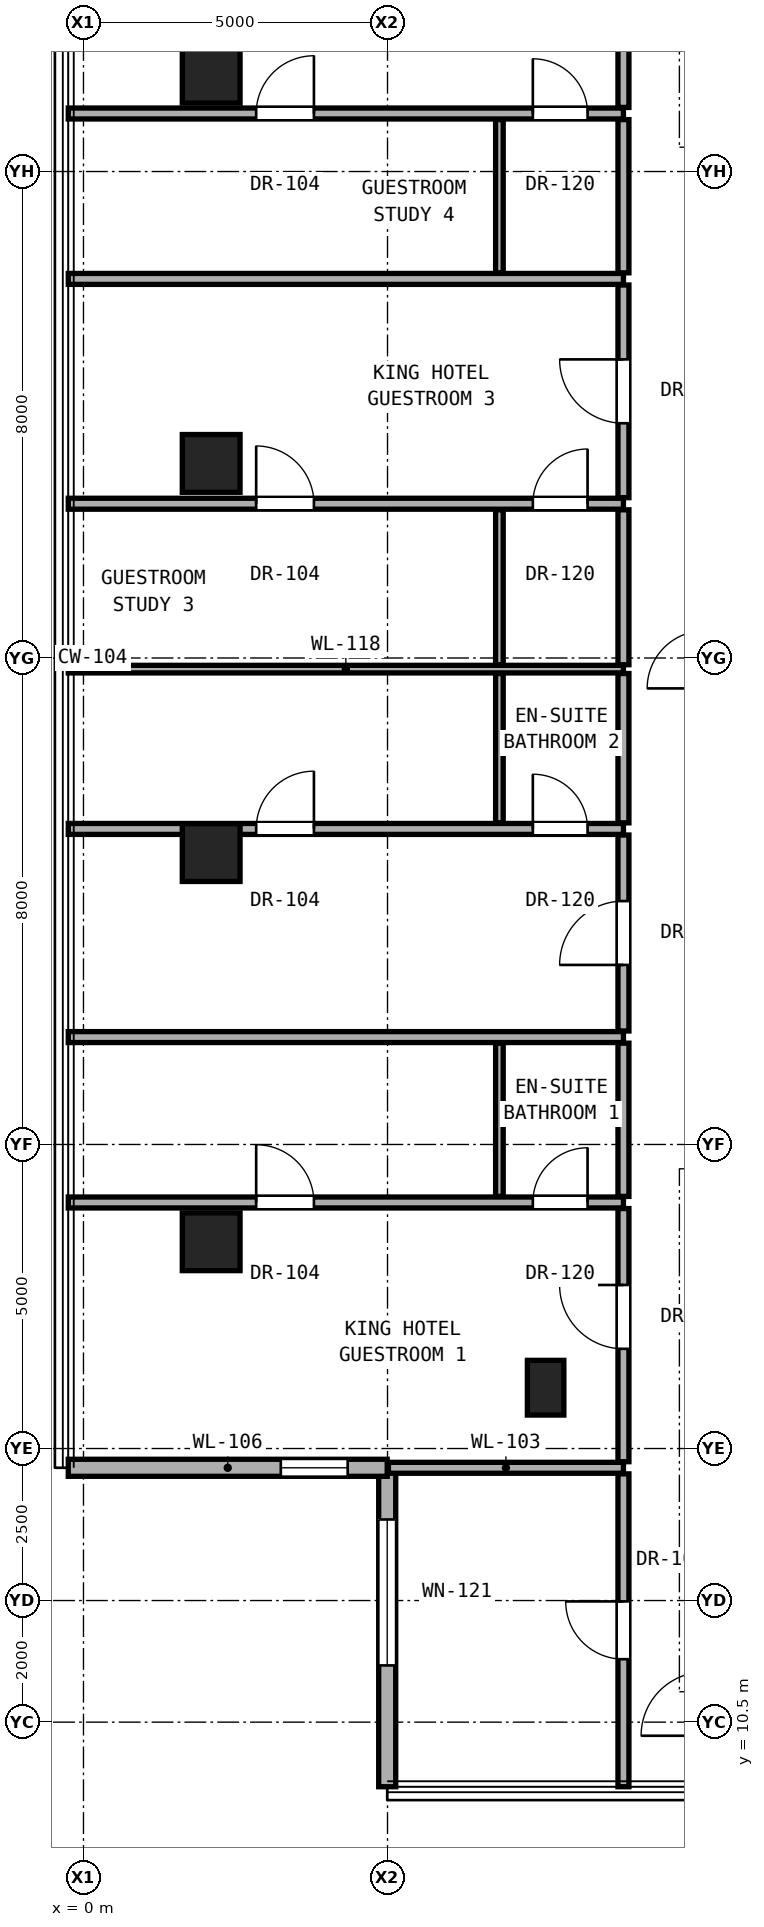
"""IFC4 building model, lengths in metres.
Left out: names, types, materials, properties, quantities, classifications, styles, units other than length and angle.
Written with IfcOpenShell. Run it as: python <this file> out.ifc"""

import sys

from ifc_helpers import new_model, si_unit, direction, frame, frame_2d, origin, origin_2d, place, context, subcontext, project, spatial, rectangle, hollow_rectangle, extrude, element, fill, save


model = new_model("IFC4")
c1 = context("Model", 3, precision=1e-05, world=origin(), true_north=direction((0.0, 1.0)))
c2 = subcontext(c1, "Body", "Model", "MODEL_VIEW")
j1 = project(units=[si_unit("LENGTHUNIT", "METRE"), si_unit("PLANEANGLEUNIT", "RADIAN")], contexts=[c1])
p1 = place(None, origin())
s1 = spatial("IfcSite", under=j1, at=p1, CompositionType="ELEMENT")
p2 = place(p1, origin())
s2 = spatial("IfcBuilding", under=s1, at=p2, CompositionType="ELEMENT")
p3 = place(p2, frame((0.0, 0.0, 167.4)))
s3 = spatial("IfcBuildingStorey", under=s2, at=p3, CompositionType="ELEMENT", Elevation=167.4)
for number, where, z_axis, x_axis in (
    (1, (2.1, 18.4, 0.0), (0.0, 0.0, 1.0), (1.0, 0.0, 0.0)),
    (2, (2.1, 24.8, 0.0), (0.0, 0.0, 1.0), (1.0, 0.0, 0.0)),
    (3, (2.1, 31.2, 0.0), (0.0, 0.0, 1.0), (1.0, 0.0, 0.0)),
    (4, (2.1, 37.6, 0.0), (0.0, 0.0, 1.0), (1.0, 0.0, 0.0)),
):
    element("IfcColumn", number, at=place(p3, frame(where, z_axis=z_axis, x_axis=x_axis)), inside=s3, PredefinedType="COLUMN", context=c2, shape_type="SweptSolid", body=[
        extrude(hollow_rectangle(XDim=0.95, YDim=0.95, WallThickness=0.05, at=origin_2d()), origin(), (0.0, 0.0, 1.0), 3.25),
    ])
p4 = place(p3, frame((7.6, 16.0, 0.0), z_axis=(0.0, 0.0, 1.0), x_axis=(1.0, 0.0, 0.0)))
e5 = element("IfcColumn", 5, at=p4, inside=s3, PredefinedType="PILASTER", context=c2, shape_type="SweptSolid", body=[
    extrude(rectangle(XDim=0.6, YDim=0.9, at=origin_2d()), origin(), (0.0, 0.0, 1.0), 3.25),
])
p5 = place(p3, frame((4.995, 14.683, 0.0), z_axis=(0.0, 0.0, 1.0), x_axis=(0.0, -1.0, 0.0)))
e6 = element("IfcWall", 6, at=p5, inside=s3, PredefinedType="SOLIDWALL", context=c2, shape_type="SweptSolid", body=[
    extrude(rectangle(XDim=5.245, YDim=0.28, at=frame_2d((2.623, 0.0))), origin(), (0.0, 0.0, 1.0), 3.03),
])
p6 = place(p5, frame((0.85, 0.0, 0.53)))
e7 = element("IfcOpeningElement", 7, at=p6, cuts=e6, PredefinedType="OPENING", context=c2, shape_type="SweptSolid", body=[
    extrude(rectangle(XDim=2.4, YDim=2.35, at=frame_2d((1.2, 1.175))), frame((0.0, 0.15, 0.0), z_axis=(0.0, -1.0, 0.0), x_axis=(1.0, 0.0, 0.0)), (0.0, 0.0, 1.0), 0.3),
])
p7 = place(p3, frame((-0.25, 14.683, 0.0), z_axis=(0.0, 0.0, 1.0), x_axis=(1.0, 0.0, 0.0)))
e8 = element("IfcWall", 8, at=p7, inside=s3, PredefinedType="SOLIDWALL", context=c2, shape_type="SweptSolid", body=[
    extrude(rectangle(XDim=5.245, YDim=0.28, at=frame_2d((2.623, 0.0))), origin(), (0.0, 0.0, 1.0), 3.03),
])
p8 = place(p7, frame((3.495, 0.0, 0.85)))
e9 = element("IfcOpeningElement", 9, at=p8, cuts=e8, PredefinedType="OPENING", context=c2, shape_type="SweptSolid", body=[
    extrude(rectangle(XDim=1.1, YDim=2.0, at=frame_2d((0.55, 1.0))), frame((0.0, 0.15, 0.0), z_axis=(0.0, -1.0, 0.0), x_axis=(1.0, 0.0, 0.0)), (0.0, 0.0, 1.0), 0.3),
])
p9 = place(p3, frame((5.015, 14.683, 0.0), z_axis=(0.0, 0.0, 1.0), x_axis=(1.0, 0.0, 0.0)))
e10 = element("IfcWall", 10, at=p9, inside=s3, PredefinedType="PARTITIONING", context=c2, shape_type="SweptSolid", body=[
    extrude(rectangle(XDim=3.865, YDim=0.18, at=frame_2d((1.933, 0.0))), origin(), (0.0, 0.0, 1.0), 3.05),
])
p10 = place(p3, frame((-0.25, 19.046, 0.0), z_axis=(0.0, 0.0, 1.0), x_axis=(1.0, 0.0, 0.0)))
e11 = element("IfcWall", 11, at=p10, inside=s3, PredefinedType="PARTITIONING", context=c2, shape_type="SweptSolid", body=[
    extrude(rectangle(XDim=9.13, YDim=0.18, at=frame_2d((4.565, 0.0))), origin(), (0.0, 0.0, 1.0), 2.269),
])
p11 = place(p10, frame((3.09, 0.0, 0.0)))
e12 = element("IfcOpeningElement", 12, at=p11, cuts=e11, PredefinedType="OPENING", context=c2, shape_type="SweptSolid", body=[
    extrude(rectangle(XDim=0.95, YDim=2.15, at=frame_2d((0.475, 1.075))), frame((0.0, 0.1, 0.0), z_axis=(0.0, -1.0, 0.0), x_axis=(1.0, 0.0, 0.0)), (0.0, 0.0, 1.0), 0.2),
])
p12 = place(p10, frame((7.64, 0.0, 0.0)))
e13 = element("IfcOpeningElement", 13, at=p12, cuts=e11, PredefinedType="OPENING", context=c2, shape_type="SweptSolid", body=[
    extrude(rectangle(XDim=0.9, YDim=2.1, at=frame_2d((0.45, 1.05))), frame((0.0, 0.1, 0.0), z_axis=(0.0, -1.0, 0.0), x_axis=(1.0, 0.0, 0.0)), (0.0, 0.0, 1.0), 0.2),
])
p13 = place(p3, frame((-0.25, 21.766, 0.0), z_axis=(0.0, 0.0, 1.0), x_axis=(1.0, 0.0, 0.0)))
e14 = element("IfcWall", 14, at=p13, inside=s3, PredefinedType="PARTITIONING", context=c2, shape_type="SweptSolid", body=[
    extrude(rectangle(XDim=9.13, YDim=0.18, at=frame_2d((4.565, 0.0))), origin(), (0.0, 0.0, 1.0), 2.269),
])
p14 = place(p3, frame((-0.25, 25.189, 0.0), z_axis=(0.0, 0.0, 1.0), x_axis=(1.0, 0.0, 0.0)))
e15 = element("IfcWall", 15, at=p14, inside=s3, PredefinedType="PARTITIONING", context=c2, shape_type="SweptSolid", body=[
    extrude(rectangle(XDim=9.13, YDim=0.18, at=frame_2d((4.565, 0.0))), origin(), (0.0, 0.0, 1.0), 2.269),
])
p15 = place(p14, frame((3.09, 0.0, 0.0)))
e16 = element("IfcOpeningElement", 16, at=p15, cuts=e15, PredefinedType="OPENING", context=c2, shape_type="SweptSolid", body=[
    extrude(rectangle(XDim=0.95, YDim=2.15, at=frame_2d((0.475, 1.075))), frame((0.0, 0.1, 0.0), z_axis=(0.0, -1.0, 0.0), x_axis=(1.0, 0.0, 0.0)), (0.0, 0.0, 1.0), 0.2),
])
p16 = place(p14, frame((7.64, 0.0, 0.0)))
e17 = element("IfcOpeningElement", 17, at=p16, cuts=e15, PredefinedType="OPENING", context=c2, shape_type="SweptSolid", body=[
    extrude(rectangle(XDim=0.9, YDim=2.1, at=frame_2d((0.45, 1.05))), frame((0.0, 0.1, 0.0), z_axis=(0.0, -1.0, 0.0), x_axis=(1.0, 0.0, 0.0)), (0.0, 0.0, 1.0), 0.2),
])
p17 = place(p3, frame((-0.25, 27.817, 0.0), z_axis=(0.0, 0.0, 1.0), x_axis=(1.0, 0.0, 0.0)))
e18 = element("IfcWall", 18, at=p17, inside=s3, PredefinedType="PARTITIONING", context=c2, shape_type="SweptSolid", body=[
    extrude(rectangle(XDim=9.13, YDim=0.125, at=frame_2d((4.565, 0.0))), origin(), (0.0, 0.0, 1.0), 2.269),
])
p18 = place(p3, frame((-0.25, 30.537, 0.0), z_axis=(0.0, 0.0, 1.0), x_axis=(1.0, 0.0, 0.0)))
e19 = element("IfcWall", 19, at=p18, inside=s3, PredefinedType="PARTITIONING", context=c2, shape_type="SweptSolid", body=[
    extrude(rectangle(XDim=9.13, YDim=0.18, at=frame_2d((4.565, 0.0))), origin(), (0.0, 0.0, 1.0), 2.269),
])
p19 = place(p18, frame((3.09, 0.0, 0.0)))
e20 = element("IfcOpeningElement", 20, at=p19, cuts=e19, PredefinedType="OPENING", context=c2, shape_type="SweptSolid", body=[
    extrude(rectangle(XDim=0.95, YDim=2.15, at=frame_2d((0.475, 1.075))), frame((0.0, 0.1, 0.0), z_axis=(0.0, -1.0, 0.0), x_axis=(1.0, 0.0, 0.0)), (0.0, 0.0, 1.0), 0.2),
])
p20 = place(p18, frame((7.64, 0.0, 0.0)))
e21 = element("IfcOpeningElement", 21, at=p20, cuts=e19, PredefinedType="OPENING", context=c2, shape_type="SweptSolid", body=[
    extrude(rectangle(XDim=0.9, YDim=2.1, at=frame_2d((0.45, 1.05))), frame((0.0, 0.1, 0.0), z_axis=(0.0, -1.0, 0.0), x_axis=(1.0, 0.0, 0.0)), (0.0, 0.0, 1.0), 0.2),
])
p21 = place(p3, frame((-0.25, 34.234, 0.0), z_axis=(0.0, 0.0, 1.0), x_axis=(1.0, 0.0, 0.0)))
e22 = element("IfcWall", 22, at=p21, inside=s3, PredefinedType="PARTITIONING", context=c2, shape_type="SweptSolid", body=[
    extrude(rectangle(XDim=9.13, YDim=0.18, at=frame_2d((4.565, 0.0))), origin(), (0.0, 0.0, 1.0), 2.269),
])
p22 = place(p3, frame((-0.25, 36.954, 0.0), z_axis=(0.0, 0.0, 1.0), x_axis=(1.0, 0.0, 0.0)))
e23 = element("IfcWall", 23, at=p22, inside=s3, PredefinedType="PARTITIONING", context=c2, shape_type="SweptSolid", body=[
    extrude(rectangle(XDim=9.13, YDim=0.18, at=frame_2d((4.565, 0.0))), origin(), (0.0, 0.0, 1.0), 2.269),
])
p23 = place(p22, frame((3.09, 0.0, 0.0)))
e24 = element("IfcOpeningElement", 24, at=p23, cuts=e23, PredefinedType="OPENING", context=c2, shape_type="SweptSolid", body=[
    extrude(rectangle(XDim=0.95, YDim=2.15, at=frame_2d((0.475, 1.075))), frame((0.0, 0.1, 0.0), z_axis=(0.0, -1.0, 0.0), x_axis=(1.0, 0.0, 0.0)), (0.0, 0.0, 1.0), 0.2),
])
p24 = place(p22, frame((7.64, 0.0, 0.0)))
e25 = element("IfcOpeningElement", 25, at=p24, cuts=e23, PredefinedType="OPENING", context=c2, shape_type="SweptSolid", body=[
    extrude(rectangle(XDim=0.9, YDim=2.1, at=frame_2d((0.45, 1.05))), frame((0.0, 0.1, 0.0), z_axis=(0.0, -1.0, 0.0), x_axis=(1.0, 0.0, 0.0)), (0.0, 0.0, 1.0), 0.2),
])
p25 = place(p3, frame((6.84, 19.146, 0.0), z_axis=(0.0, 0.0, 1.0), x_axis=(0.0, 1.0, 0.0)))
e26 = element("IfcWall", 26, at=p25, inside=s3, PredefinedType="PARTITIONING", context=c2, shape_type="SweptSolid", body=[
    extrude(rectangle(XDim=2.52, YDim=0.125, at=frame_2d((1.26, 0.0))), origin(), (0.0, 0.0, 1.0), 3.05),
])
p26 = place(p3, frame((6.84, 25.289, 0.0), z_axis=(0.0, 0.0, 1.0), x_axis=(0.0, 1.0, 0.0)))
e27 = element("IfcWall", 27, at=p26, inside=s3, PredefinedType="PARTITIONING", context=c2, shape_type="SweptSolid", body=[
    extrude(rectangle(XDim=2.455, YDim=0.125, at=frame_2d((1.228, 0.0))), origin(), (0.0, 0.0, 1.0), 3.05),
])
p27 = place(p3, frame((6.84, 27.889, 0.0), z_axis=(0.0, 0.0, 1.0), x_axis=(0.0, 1.0, 0.0)))
e28 = element("IfcWall", 28, at=p27, inside=s3, PredefinedType="PARTITIONING", context=c2, shape_type="SweptSolid", body=[
    extrude(rectangle(XDim=2.548, YDim=0.125, at=frame_2d((1.274, 0.0))), origin(), (0.0, 0.0, 1.0), 3.05),
])
p28 = place(p3, frame((6.84, 34.334, 0.0), z_axis=(0.0, 0.0, 1.0), x_axis=(0.0, 1.0, 0.0)))
e29 = element("IfcWall", 29, at=p28, inside=s3, PredefinedType="PARTITIONING", context=c2, shape_type="SweptSolid", body=[
    extrude(rectangle(XDim=2.52, YDim=0.125, at=frame_2d((1.26, 0.0))), origin(), (0.0, 0.0, 1.0), 3.05),
])
p29 = place(p3, frame((8.88, 9.438, 0.0), z_axis=(0.0, 0.0, 1.0), x_axis=(0.0, 1.0, 0.0)))
e30 = element("IfcWall", 30, at=p29, inside=s3, PredefinedType="PARTITIONING", context=c2, shape_type="SweptSolid", body=[
    extrude(rectangle(XDim=5.145, YDim=0.18, at=frame_2d((2.573, 0.0))), origin(), (0.0, 0.0, 1.0), 3.05),
])
p30 = place(p29, frame((2.097, 0.0, 0.0)))
e31 = element("IfcOpeningElement", 31, at=p30, cuts=e30, PredefinedType="OPENING", context=c2, shape_type="SweptSolid", body=[
    extrude(rectangle(XDim=0.95, YDim=2.15, at=frame_2d((0.475, 1.075))), frame((0.0, 0.1, 0.0), z_axis=(0.0, -1.0, 0.0), x_axis=(1.0, 0.0, 0.0)), (0.0, 0.0, 1.0), 0.2),
])
p31 = place(p3, frame((8.88, 14.783, 0.0), z_axis=(0.0, 0.0, 1.0), x_axis=(0.0, 1.0, 0.0)))
e32 = element("IfcWall", 32, at=p31, inside=s3, PredefinedType="PARTITIONING", context=c2, shape_type="SweptSolid", body=[
    extrude(rectangle(XDim=4.163, YDim=0.18, at=frame_2d((2.082, 0.0))), origin(), (0.0, 0.0, 1.0), 2.442),
])
p32 = place(p31, frame((1.856, 0.0, 0.0)))
e33 = element("IfcOpeningElement", 33, at=p32, cuts=e32, PredefinedType="OPENING", context=c2, shape_type="SweptSolid", body=[
    extrude(rectangle(XDim=1.05, YDim=2.2, at=frame_2d((0.525, 1.1))), frame((0.0, 0.1, 0.0), z_axis=(0.0, -1.0, 0.0), x_axis=(1.0, 0.0, 0.0)), (0.0, 0.0, 1.0), 0.2),
])
p33 = place(p3, frame((8.88, 19.146, 0.0), z_axis=(0.0, 0.0, 1.0), x_axis=(0.0, 1.0, 0.0)))
e34 = element("IfcWall", 34, at=p33, inside=s3, PredefinedType="PARTITIONING", context=c2, shape_type="SweptSolid", body=[
    extrude(rectangle(XDim=2.52, YDim=0.18, at=frame_2d((1.26, 0.0))), origin(), (0.0, 0.0, 1.0), 3.05),
])
p34 = place(p3, frame((8.88, 21.866, 0.0), z_axis=(0.0, 0.0, 1.0), x_axis=(0.0, 1.0, 0.0)))
e35 = element("IfcWall", 35, at=p34, inside=s3, PredefinedType="PARTITIONING", context=c2, shape_type="SweptSolid", body=[
    extrude(rectangle(XDim=3.223, YDim=0.18, at=frame_2d((1.612, 0.0))), origin(), (0.0, 0.0, 1.0), 2.346),
])
p35 = place(p34, frame((1.086, 0.0, 0.0)))
e36 = element("IfcOpeningElement", 36, at=p35, cuts=e35, PredefinedType="OPENING", context=c2, shape_type="SweptSolid", body=[
    extrude(rectangle(XDim=1.05, YDim=2.2, at=frame_2d((0.525, 1.1))), frame((0.0, 0.1, 0.0), z_axis=(0.0, -1.0, 0.0), x_axis=(1.0, 0.0, 0.0)), (0.0, 0.0, 1.0), 0.2),
])
p36 = place(p3, frame((8.88, 25.289, 0.0), z_axis=(0.0, 0.0, 1.0), x_axis=(0.0, 1.0, 0.0)))
e37 = element("IfcWall", 37, at=p36, inside=s3, PredefinedType="PARTITIONING", context=c2, shape_type="SweptSolid", body=[
    extrude(rectangle(XDim=2.455, YDim=0.18, at=frame_2d((1.228, 0.0))), origin(), (0.0, 0.0, 1.0), 3.05),
])
p37 = place(p3, frame((8.88, 27.889, 0.0), z_axis=(0.0, 0.0, 1.0), x_axis=(0.0, 1.0, 0.0)))
e38 = element("IfcWall", 38, at=p37, inside=s3, PredefinedType="PARTITIONING", context=c2, shape_type="SweptSolid", body=[
    extrude(rectangle(XDim=2.548, YDim=0.18, at=frame_2d((1.274, 0.0))), origin(), (0.0, 0.0, 1.0), 3.05),
])
p38 = place(p3, frame((8.88, 30.637, 0.0), z_axis=(0.0, 0.0, 1.0), x_axis=(0.0, 1.0, 0.0)))
e39 = element("IfcWall", 39, at=p38, inside=s3, PredefinedType="PARTITIONING", context=c2, shape_type="SweptSolid", body=[
    extrude(rectangle(XDim=3.497, YDim=0.18, at=frame_2d((1.749, 0.0))), origin(), (0.0, 0.0, 1.0), 2.346),
])
p39 = place(p38, frame((1.223, 0.0, 0.0)))
e40 = element("IfcOpeningElement", 40, at=p39, cuts=e39, PredefinedType="OPENING", context=c2, shape_type="SweptSolid", body=[
    extrude(rectangle(XDim=1.05, YDim=2.2, at=frame_2d((0.525, 1.1))), frame((0.0, 0.1, 0.0), z_axis=(0.0, -1.0, 0.0), x_axis=(1.0, 0.0, 0.0)), (0.0, 0.0, 1.0), 0.2),
])
p40 = place(p3, frame((8.88, 34.334, 0.0), z_axis=(0.0, 0.0, 1.0), x_axis=(0.0, 1.0, 0.0)))
e41 = element("IfcWall", 41, at=p40, inside=s3, PredefinedType="PARTITIONING", context=c2, shape_type="SweptSolid", body=[
    extrude(rectangle(XDim=2.52, YDim=0.18, at=frame_2d((1.26, 0.0))), origin(), (0.0, 0.0, 1.0), 3.05),
])
p41 = place(p3, frame((8.88, 37.054, 0.0), z_axis=(0.0, 0.0, 1.0), x_axis=(0.0, 1.0, 0.0)))
e42 = element("IfcWall", 42, at=p41, inside=s3, PredefinedType="PARTITIONING", context=c2, shape_type="SweptSolid", body=[
    extrude(rectangle(XDim=4.163, YDim=0.18, at=frame_2d((2.082, 0.0))), origin(), (0.0, 0.0, 1.0), 2.442),
])
p42 = place(p41, frame((1.257, 0.0, 0.0)))
e43 = element("IfcOpeningElement", 43, at=p42, cuts=e42, PredefinedType="OPENING", context=c2, shape_type="SweptSolid", body=[
    extrude(rectangle(XDim=1.05, YDim=2.2, at=frame_2d((0.525, 1.1))), frame((0.0, 0.1, 0.0), z_axis=(0.0, -1.0, 0.0), x_axis=(1.0, 0.0, 0.0)), (0.0, 0.0, 1.0), 0.2),
])
p43 = place(p6, origin())
e44 = element("IfcWindow", 44, at=p43, inside=s3, PartitioningType="SINGLE_PANEL", PredefinedType="WINDOW", context=c2, shape_type="SweptSolid", body=[
    extrude(rectangle(XDim=2.4, YDim=2.35, at=frame_2d((1.2, 1.175))), frame((0.0, 0.03, 0.0), z_axis=(0.0, -1.0, 0.0), x_axis=(1.0, 0.0, 0.0)), (0.0, 0.0, 1.0), 0.06),
])
fill(e7, e44)
p44 = place(p8, origin())
e45 = element("IfcWindow", 45, at=p44, inside=s3, PartitioningType="SINGLE_PANEL", PredefinedType="WINDOW", context=c2, shape_type="SweptSolid", body=[
    extrude(rectangle(XDim=1.1, YDim=2.0, at=frame_2d((0.55, 1.0))), frame((0.0, 0.03, 0.0), z_axis=(0.0, -1.0, 0.0), x_axis=(1.0, 0.0, 0.0)), (0.0, 0.0, 1.0), 0.06),
])
fill(e9, e45)
p45 = place(p32, origin())
e46 = element("IfcDoor", 46, at=p45, inside=s3, OperationType="SINGLE_SWING_RIGHT", PredefinedType="DOOR", context=c2, shape_type="SweptSolid", body=[
    extrude(rectangle(XDim=1.05, YDim=2.2, at=frame_2d((0.525, 1.1))), frame((0.0, 0.025, 0.0), z_axis=(0.0, -1.0, 0.0), x_axis=(1.0, 0.0, 0.0)), (0.0, 0.0, 1.0), 0.05),
])
fill(e33, e46)
p46 = place(p11, origin())
e47 = element("IfcDoor", 47, at=p46, inside=s3, OperationType="SINGLE_SWING_LEFT", PredefinedType="DOOR", context=c2, shape_type="SweptSolid", body=[
    extrude(rectangle(XDim=0.95, YDim=2.15, at=frame_2d((0.475, 1.075))), frame((0.0, 0.025, 0.0), z_axis=(0.0, -1.0, 0.0), x_axis=(1.0, 0.0, 0.0)), (0.0, 0.0, 1.0), 0.05),
])
fill(e12, e47)
p47 = place(p12, origin())
e48 = element("IfcDoor", 48, at=p47, inside=s3, OperationType="SINGLE_SWING_RIGHT", PredefinedType="DOOR", context=c2, shape_type="SweptSolid", body=[
    extrude(rectangle(XDim=0.9, YDim=2.1, at=frame_2d((0.45, 1.05))), frame((0.0, 0.025, 0.0), z_axis=(0.0, -1.0, 0.0), x_axis=(1.0, 0.0, 0.0)), (0.0, 0.0, 1.0), 0.05),
])
fill(e13, e48)
p48 = place(p35, origin())
e49 = element("IfcDoor", 49, at=p48, inside=s3, OperationType="SINGLE_SWING_LEFT", PredefinedType="DOOR", context=c2, shape_type="SweptSolid", body=[
    extrude(rectangle(XDim=1.05, YDim=2.2, at=frame_2d((0.525, 1.1))), frame((0.0, 0.025, 0.0), z_axis=(0.0, -1.0, 0.0), x_axis=(1.0, 0.0, 0.0)), (0.0, 0.0, 1.0), 0.05),
])
fill(e36, e49)
p49 = place(p15, origin())
e50 = element("IfcDoor", 50, at=p49, inside=s3, OperationType="SINGLE_SWING_RIGHT", PredefinedType="DOOR", context=c2, shape_type="SweptSolid", body=[
    extrude(rectangle(XDim=0.95, YDim=2.15, at=frame_2d((0.475, 1.075))), frame((0.0, 0.025, 0.0), z_axis=(0.0, -1.0, 0.0), x_axis=(1.0, 0.0, 0.0)), (0.0, 0.0, 1.0), 0.05),
])
fill(e16, e50)
p50 = place(p16, origin())
e51 = element("IfcDoor", 51, at=p50, inside=s3, OperationType="SINGLE_SWING_LEFT", PredefinedType="DOOR", context=c2, shape_type="SweptSolid", body=[
    extrude(rectangle(XDim=0.9, YDim=2.1, at=frame_2d((0.45, 1.05))), frame((0.0, 0.025, 0.0), z_axis=(0.0, -1.0, 0.0), x_axis=(1.0, 0.0, 0.0)), (0.0, 0.0, 1.0), 0.05),
])
fill(e17, e51)
p51 = place(p39, origin())
e52 = element("IfcDoor", 52, at=p51, inside=s3, OperationType="SINGLE_SWING_RIGHT", PredefinedType="DOOR", context=c2, shape_type="SweptSolid", body=[
    extrude(rectangle(XDim=1.05, YDim=2.2, at=frame_2d((0.525, 1.1))), frame((0.0, 0.025, 0.0), z_axis=(0.0, -1.0, 0.0), x_axis=(1.0, 0.0, 0.0)), (0.0, 0.0, 1.0), 0.05),
])
fill(e40, e52)
p52 = place(p19, origin())
e53 = element("IfcDoor", 53, at=p52, inside=s3, OperationType="SINGLE_SWING_LEFT", PredefinedType="DOOR", context=c2, shape_type="SweptSolid", body=[
    extrude(rectangle(XDim=0.95, YDim=2.15, at=frame_2d((0.475, 1.075))), frame((0.0, 0.025, 0.0), z_axis=(0.0, -1.0, 0.0), x_axis=(1.0, 0.0, 0.0)), (0.0, 0.0, 1.0), 0.05),
])
fill(e20, e53)
p53 = place(p20, origin())
e54 = element("IfcDoor", 54, at=p53, inside=s3, OperationType="SINGLE_SWING_RIGHT", PredefinedType="DOOR", context=c2, shape_type="SweptSolid", body=[
    extrude(rectangle(XDim=0.9, YDim=2.1, at=frame_2d((0.45, 1.05))), frame((0.0, 0.025, 0.0), z_axis=(0.0, -1.0, 0.0), x_axis=(1.0, 0.0, 0.0)), (0.0, 0.0, 1.0), 0.05),
])
fill(e21, e54)
p54 = place(p23, origin())
e55 = element("IfcDoor", 55, at=p54, inside=s3, OperationType="SINGLE_SWING_RIGHT", PredefinedType="DOOR", context=c2, shape_type="SweptSolid", body=[
    extrude(rectangle(XDim=0.95, YDim=2.15, at=frame_2d((0.475, 1.075))), frame((0.0, 0.025, 0.0), z_axis=(0.0, -1.0, 0.0), x_axis=(1.0, 0.0, 0.0)), (0.0, 0.0, 1.0), 0.05),
])
fill(e24, e55)
p55 = place(p24, origin())
e56 = element("IfcDoor", 56, at=p55, inside=s3, OperationType="SINGLE_SWING_LEFT", PredefinedType="DOOR", context=c2, shape_type="SweptSolid", body=[
    extrude(rectangle(XDim=0.9, YDim=2.1, at=frame_2d((0.45, 1.05))), frame((0.0, 0.025, 0.0), z_axis=(0.0, -1.0, 0.0), x_axis=(1.0, 0.0, 0.0)), (0.0, 0.0, 1.0), 0.05),
])
fill(e25, e56)
p56 = place(p30, origin())
e57 = element("IfcDoor", 57, at=p56, inside=s3, OperationType="SINGLE_SWING_RIGHT", PredefinedType="DOOR", context=c2, shape_type="SweptSolid", body=[
    extrude(rectangle(XDim=0.95, YDim=2.15, at=frame_2d((0.475, 1.075))), frame((0.0, 0.025, 0.0), z_axis=(0.0, -1.0, 0.0), x_axis=(1.0, 0.0, 0.0)), (0.0, 0.0, 1.0), 0.05),
])
fill(e31, e57)
save(model, sys.argv[1])
